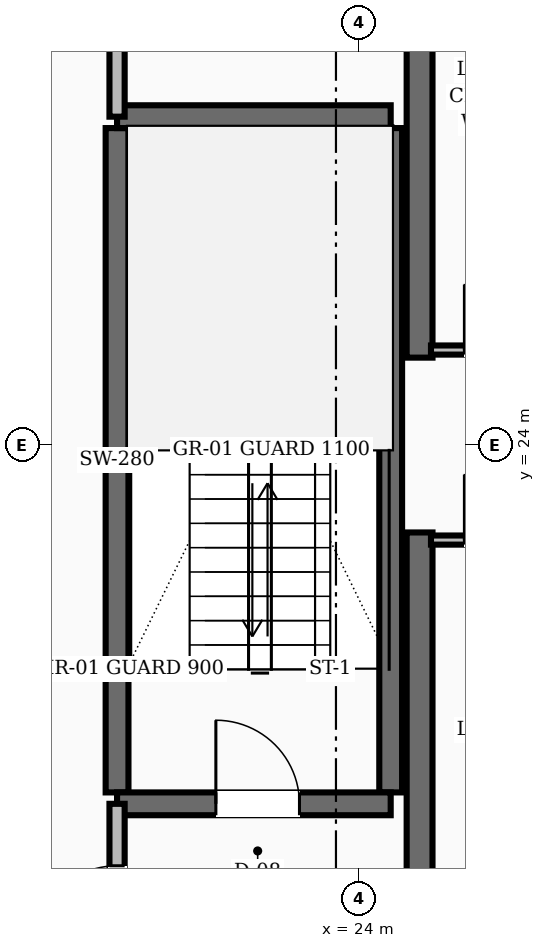
"""IFC4 building model, lengths in metres.
Left out: names, types, materials, properties, quantities, classifications, styles, units other than length and angle.
Written with IfcOpenShell. Run it as: python <this file> out.ifc"""

import sys

from ifc_helpers import new_model, si_unit, direction, frame, frame_2d, origin, place, context, subcontext, project, spatial, rectangle, extrude, element, fill, save


model = new_model("IFC4")
c1 = context("Model", 3, precision=1e-05, world=origin(), true_north=direction((0.0, 1.0)))
c2 = subcontext(c1, "Body", "Model", "MODEL_VIEW")
j1 = project(units=[si_unit("LENGTHUNIT", "METRE"), si_unit("PLANEANGLEUNIT", "RADIAN")], contexts=[c1])
p1 = place(None, origin())
s1 = spatial("IfcSite", under=j1, at=p1, CompositionType="ELEMENT")
p2 = place(p1, origin())
s2 = spatial("IfcBuilding", under=s1, at=p2, CompositionType="ELEMENT")
p3 = place(p2, frame((0.0, 0.0, 171.2)))
s3 = spatial("IfcBuildingStorey", under=s2, at=p3, CompositionType="ELEMENT", Elevation=171.2)
for number, where, z_axis, x_axis in (
    (1, (24.8, 16.55, 0.0), (0.0, 0.0, 1.0), (0.0, 1.0, 0.0)),
    (2, (24.8, 25.15, 0.0), (0.0, 0.0, 1.0), (0.0, 1.0, 0.0)),
):
    element("IfcWall", number, at=place(p3, frame(where, z_axis=z_axis, x_axis=x_axis)), inside=s3, PredefinedType="SHEAR", context=c2, shape_type="SweptSolid", body=[
        extrude(rectangle(XDim=6.3, YDim=0.34, at=frame_2d((3.15, 0.0))), origin(), (0.0, 0.0, 1.0), 3.6),
    ])
for number, where, z_axis, x_axis in (
    (3, (20.82, 19.43, 0.0), (0.0, 0.0, 1.0), (0.0, 1.0, 0.0)),
    (4, (24.42, 19.43, 0.0), (0.0, 0.0, 1.0), (0.0, 1.0, 0.0)),
):
    element("IfcWall", number, at=place(p3, frame(where, z_axis=z_axis, x_axis=x_axis)), inside=s3, PredefinedType="SHEAR", context=c2, shape_type="SweptSolid", body=[
        extrude(rectangle(XDim=8.74, YDim=0.3, at=frame_2d((4.37, 0.0))), origin(), (0.0, 0.0, 1.0), 3.6),
    ])
p4 = place(p3, frame((20.82, 19.28, 0.0), z_axis=(0.0, 0.0, 1.0), x_axis=(1.0, 0.0, 0.0)))
e5 = element("IfcWall", 5, at=p4, inside=s3, PredefinedType="SHEAR", context=c2, shape_type="SweptSolid", body=[
    extrude(rectangle(XDim=3.6, YDim=0.3, at=frame_2d((1.8, 0.0))), origin(), (0.0, 0.0, 1.0), 3.6),
])
p5 = place(p4, frame((1.3, 0.0, 0.0)))
e6 = element("IfcOpeningElement", 6, at=p5, cuts=e5, PredefinedType="OPENING", context=c2, shape_type="SweptSolid", body=[
    extrude(rectangle(XDim=1.1, YDim=2.1, at=frame_2d((0.55, 1.05))), frame((0.0, 0.16, 0.0), z_axis=(0.0, -1.0, 0.0), x_axis=(1.0, 0.0, 0.0)), (0.0, 0.0, 1.0), 0.32),
])
p6 = place(p3, frame((20.82, 28.32, 0.0), z_axis=(0.0, 0.0, 1.0), x_axis=(1.0, 0.0, 0.0)))
e7 = element("IfcWall", 7, at=p6, inside=s3, PredefinedType="SHEAR", context=c2, shape_type="SweptSolid", body=[
    extrude(rectangle(XDim=3.6, YDim=0.3, at=frame_2d((1.8, 0.0))), origin(), (0.0, 0.0, 1.0), 3.6),
])
p7 = place(p3, frame((20.82, 16.55, 0.0), z_axis=(0.0, 0.0, 1.0), x_axis=(0.0, 1.0, 0.0)))
e8 = element("IfcWall", 8, at=p7, inside=s3, PredefinedType="SOLIDWALL", context=c2, shape_type="SweptSolid", body=[
    extrude(rectangle(XDim=2.73, YDim=0.2, at=frame_2d((1.365, 0.0))), origin(), (0.0, 0.0, 1.0), 2.8),
])
p8 = place(p7, frame((0.815, 0.0, 0.0)))
e9 = element("IfcOpeningElement", 9, at=p8, cuts=e8, PredefinedType="OPENING", context=c2, shape_type="SweptSolid", body=[
    extrude(rectangle(XDim=1.1, YDim=2.1, at=frame_2d((0.55, 1.05))), frame((0.0, 0.11, 0.0), z_axis=(0.0, -1.0, 0.0), x_axis=(1.0, 0.0, 0.0)), (0.0, 0.0, 1.0), 0.22),
])
p9 = place(p3, frame((20.82, 28.32, 0.0), z_axis=(0.0, 0.0, 1.0), x_axis=(0.0, 1.0, 0.0)))
e10 = element("IfcWall", 10, at=p9, inside=s3, PredefinedType="SOLIDWALL", context=c2, shape_type="SweptSolid", body=[
    extrude(rectangle(XDim=3.13, YDim=0.2, at=frame_2d((1.565, 0.0))), origin(), (0.0, 0.0, 1.0), 2.8),
])
p10 = place(p9, frame((1.09, 0.0, 0.0)))
e11 = element("IfcOpeningElement", 11, at=p10, cuts=e10, PredefinedType="OPENING", context=c2, shape_type="SweptSolid", body=[
    extrude(rectangle(XDim=0.95, YDim=2.1, at=frame_2d((0.475, 1.05))), frame((0.0, 0.11, 0.0), z_axis=(0.0, -1.0, 0.0), x_axis=(1.0, 0.0, 0.0)), (0.0, 0.0, 1.0), 0.22),
])
p11 = place(p3, frame((24.95, 25.25, 0.0), z_axis=(0.0, 0.0, 1.0), x_axis=(1.0, 0.0, 0.0)))
e12 = element("IfcWall", 12, at=p11, inside=s3, PredefinedType="PARTITIONING", context=c2, shape_type="SweptSolid", body=[
    extrude(rectangle(XDim=3.2, YDim=0.12, at=frame_2d((1.6, 0.0))), origin(), (0.0, 0.0, 1.0), 2.8),
])
p12 = place(p11, frame((0.44, 0.0, 0.0)))
e13 = element("IfcOpeningElement", 13, at=p12, cuts=e12, PredefinedType="OPENING", context=c2, shape_type="SweptSolid", body=[
    extrude(rectangle(XDim=0.86, YDim=2.1, at=frame_2d((0.43, 1.05))), frame((0.0, 0.07, 0.0), z_axis=(0.0, -1.0, 0.0), x_axis=(1.0, 0.0, 0.0)), (0.0, 0.0, 1.0), 0.14),
])
p13 = place(p11, frame((1.9, 0.0, 0.0)))
e14 = element("IfcOpeningElement", 14, at=p13, cuts=e12, PredefinedType="OPENING", context=c2, shape_type="SweptSolid", body=[
    extrude(rectangle(XDim=0.86, YDim=2.1, at=frame_2d((0.43, 1.05))), frame((0.0, 0.07, 0.0), z_axis=(0.0, -1.0, 0.0), x_axis=(1.0, 0.0, 0.0)), (0.0, 0.0, 1.0), 0.14),
])
p14 = place(p3, frame((24.95, 22.75, 0.0), z_axis=(0.0, 0.0, 1.0), x_axis=(1.0, 0.0, 0.0)))
e15 = element("IfcWall", 15, at=p14, inside=s3, PredefinedType="PARTITIONING", context=c2, shape_type="SweptSolid", body=[
    extrude(rectangle(XDim=3.2, YDim=0.12, at=frame_2d((1.6, 0.0))), origin(), (0.0, 0.0, 1.0), 2.8),
])
p15 = place(p14, frame((0.44, 0.0, 0.0)))
e16 = element("IfcOpeningElement", 16, at=p15, cuts=e15, PredefinedType="OPENING", context=c2, shape_type="SweptSolid", body=[
    extrude(rectangle(XDim=0.86, YDim=2.1, at=frame_2d((0.43, 1.05))), frame((0.0, 0.07, 0.0), z_axis=(0.0, -1.0, 0.0), x_axis=(1.0, 0.0, 0.0)), (0.0, 0.0, 1.0), 0.14),
])
p16 = place(p14, frame((1.9, 0.0, 0.0)))
e17 = element("IfcOpeningElement", 17, at=p16, cuts=e15, PredefinedType="OPENING", context=c2, shape_type="SweptSolid", body=[
    extrude(rectangle(XDim=0.86, YDim=2.1, at=frame_2d((0.43, 1.05))), frame((0.0, 0.07, 0.0), z_axis=(0.0, -1.0, 0.0), x_axis=(1.0, 0.0, 0.0)), (0.0, 0.0, 1.0), 0.14),
])
p17 = place(p5, origin())
e18 = element("IfcDoor", 18, at=p17, inside=s3, OperationType="SINGLE_SWING_LEFT", PredefinedType="DOOR", context=c2, shape_type="SweptSolid", body=[
    extrude(rectangle(XDim=1.1, YDim=2.1, at=frame_2d((0.55, 1.05))), frame((0.0, 0.025, 0.0), z_axis=(0.0, -1.0, 0.0), x_axis=(1.0, 0.0, 0.0)), (0.0, 0.0, 1.0), 0.05),
])
fill(e6, e18)
p18 = place(p8, origin())
e19 = element("IfcDoor", 19, at=p18, inside=s3, OperationType="SINGLE_SWING_LEFT", PredefinedType="DOOR", context=c2, shape_type="SweptSolid", body=[
    extrude(rectangle(XDim=1.1, YDim=2.1, at=frame_2d((0.55, 1.05))), frame((0.0, 0.025, 0.0), z_axis=(0.0, -1.0, 0.0), x_axis=(1.0, 0.0, 0.0)), (0.0, 0.0, 1.0), 0.05),
])
fill(e9, e19)
p19 = place(p12, origin())
e20 = element("IfcDoor", 20, at=p19, inside=s3, OperationType="SINGLE_SWING_LEFT", PredefinedType="DOOR", context=c2, shape_type="SweptSolid", body=[
    extrude(rectangle(XDim=0.86, YDim=2.1, at=frame_2d((0.43, 1.05))), frame((0.0, 0.025, 0.0), z_axis=(0.0, -1.0, 0.0), x_axis=(1.0, 0.0, 0.0)), (0.0, 0.0, 1.0), 0.05),
])
fill(e13, e20)
p20 = place(p15, origin())
e21 = element("IfcDoor", 21, at=p20, inside=s3, OperationType="SINGLE_SWING_LEFT", PredefinedType="DOOR", context=c2, shape_type="SweptSolid", body=[
    extrude(rectangle(XDim=0.86, YDim=2.1, at=frame_2d((0.43, 1.05))), frame((0.0, 0.025, 0.0), z_axis=(0.0, -1.0, 0.0), x_axis=(1.0, 0.0, 0.0)), (0.0, 0.0, 1.0), 0.05),
])
fill(e16, e21)
save(model, sys.argv[1])
